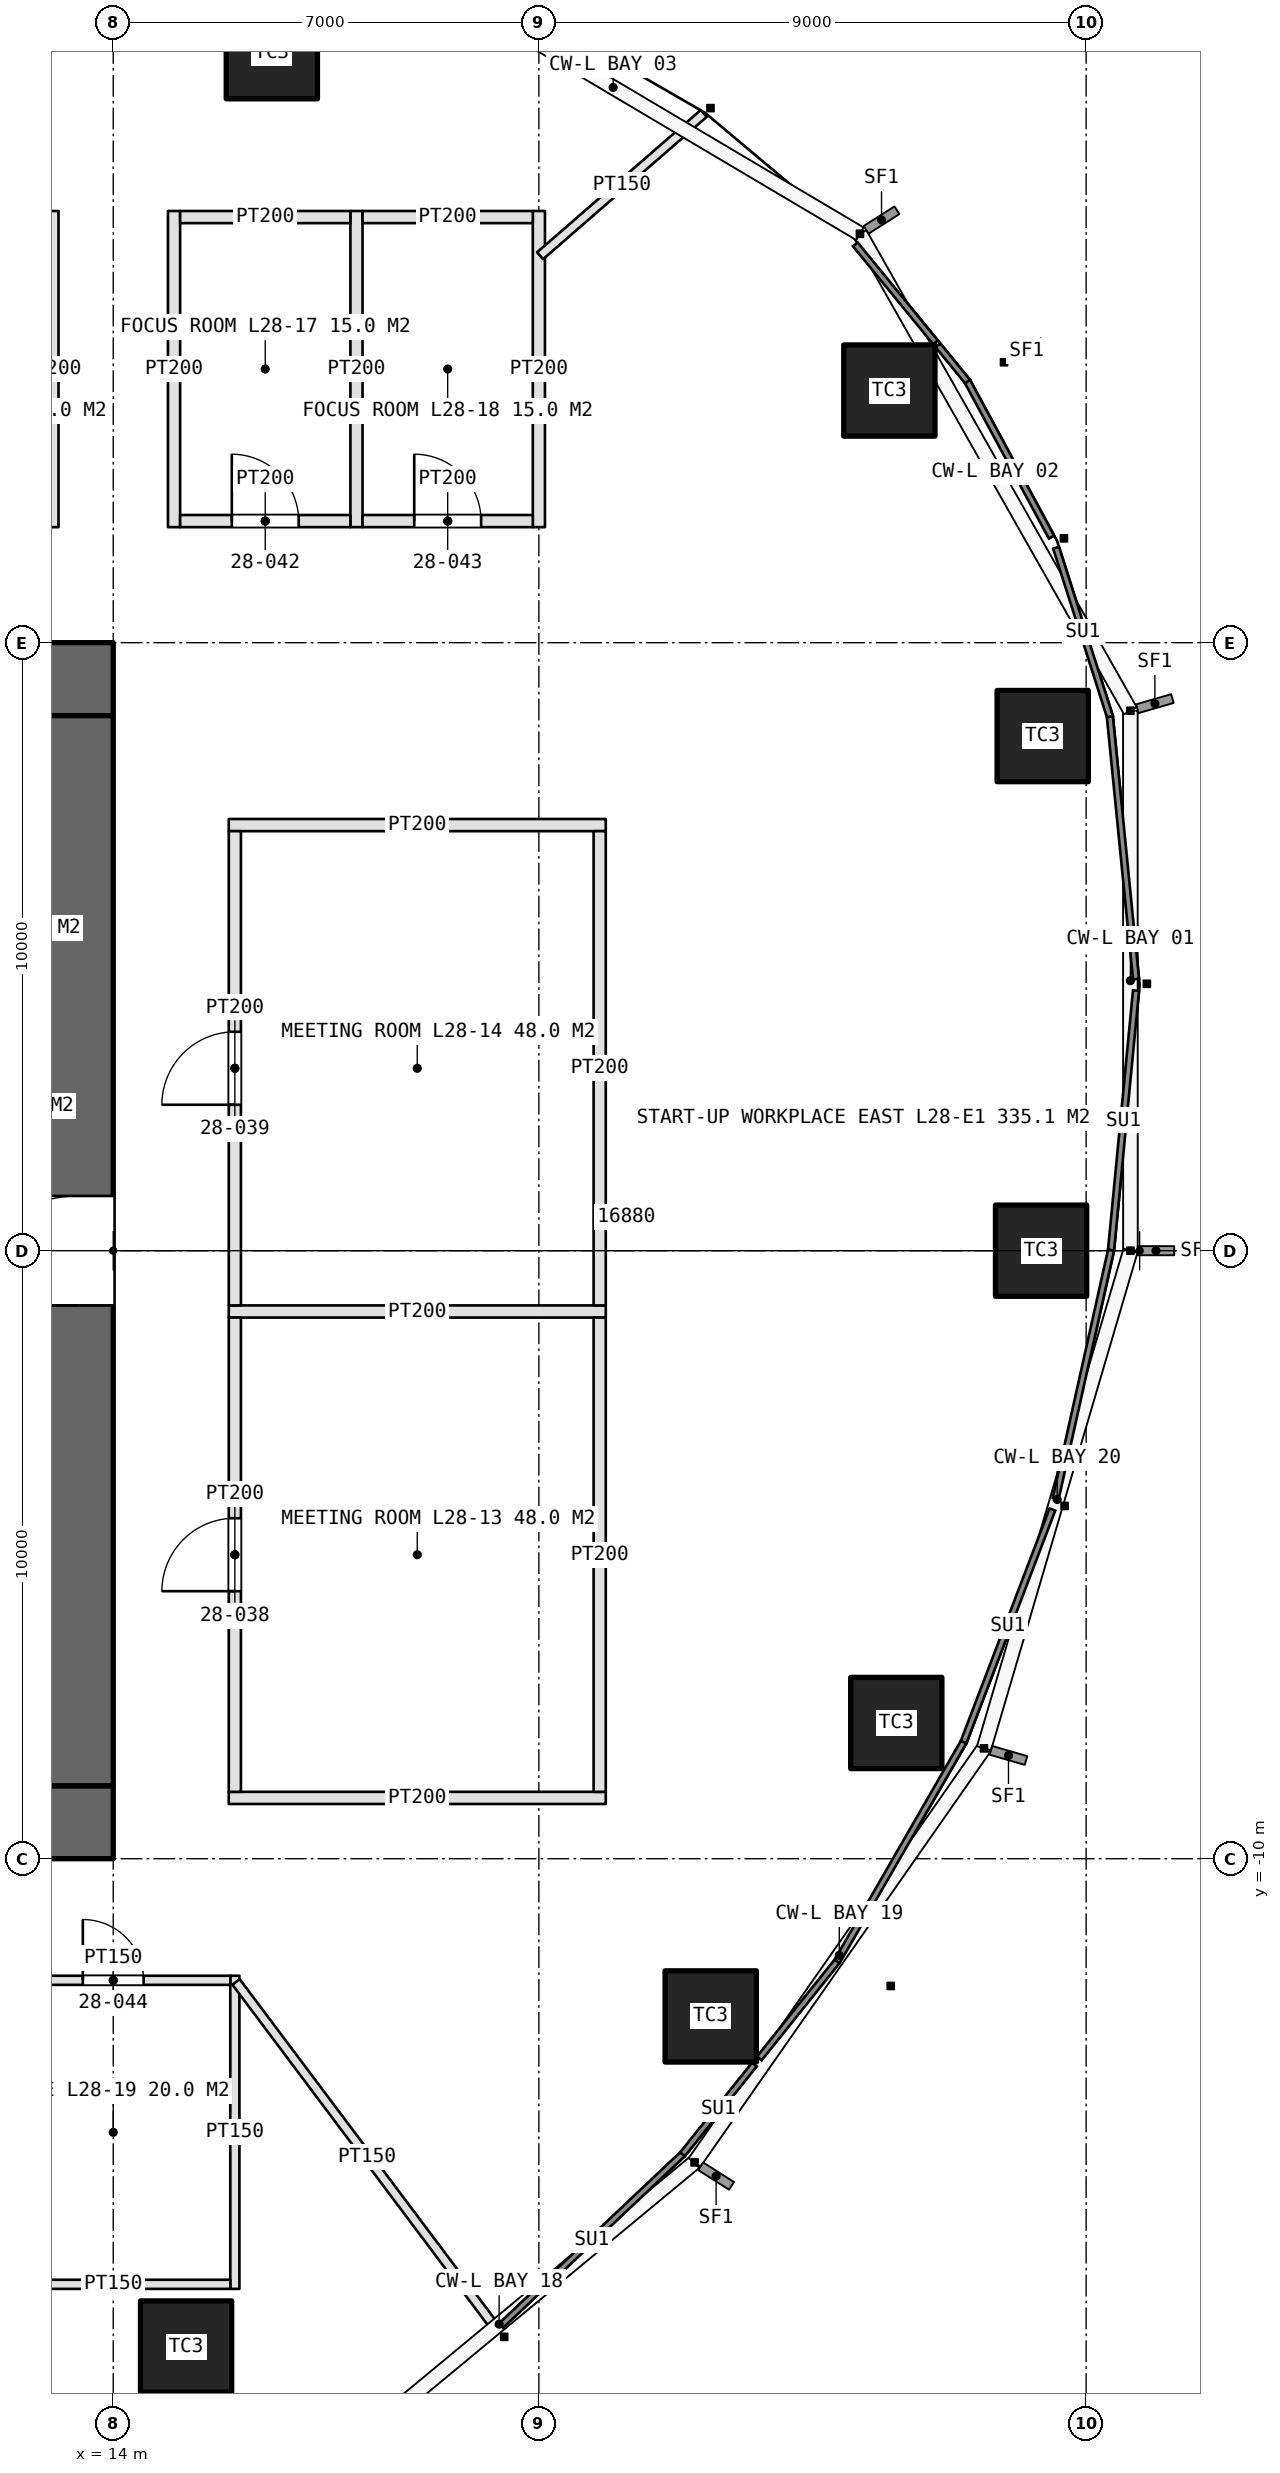
"""IFC4 building model, lengths in metres.
Left out: names, types, materials, properties, quantities, classifications, styles, units other than length and angle.
Written with IfcOpenShell. Run it as: python <this file> out.ifc"""

import sys

from ifc_helpers import new_model, si_unit, direction, frame, frame_2d, origin, origin_2d, place, context, subcontext, project, spatial, rectangle, extrude, element, fill, save


model = new_model("IFC4")
c1 = context("Model", 3, precision=1e-05, world=origin(), true_north=direction((0.0, 1.0)))
c2 = subcontext(c1, "Body", "Model", "MODEL_VIEW")
j1 = project(units=[si_unit("LENGTHUNIT", "METRE"), si_unit("PLANEANGLEUNIT", "RADIAN")], contexts=[c1])
p1 = place(None, origin())
s1 = spatial("IfcSite", under=j1, at=p1, CompositionType="ELEMENT")
p2 = place(p1, origin())
s2 = spatial("IfcBuilding", under=s1, at=p2, CompositionType="ELEMENT")
p3 = place(p2, frame((0.0, 0.0, 134.4)))
s3 = spatial("IfcBuildingStorey", under=s2, at=p3, CompositionType="ELEMENT", Elevation=134.4)
p4 = place(p3, frame((-14.0, -9.4, 0.0), z_axis=(0.0, 0.0, 1.0), x_axis=(1.0, 0.0, 0.0)))
e1 = element("IfcWall", 1, at=p4, inside=s3, PredefinedType="SHEAR", context=c2, shape_type="SweptSolid", body=[
    extrude(rectangle(XDim=28.0, YDim=1.2, at=frame_2d((14.0, 0.0))), origin(), (0.0, 0.0, 1.0), 4.2),
])
p5 = place(p4, frame((13.1, 0.0, 0.0)))
e2 = element("IfcOpeningElement", 2, at=p5, cuts=e1, PredefinedType="OPENING", context=c2, shape_type="SweptSolid", body=[
    extrude(rectangle(XDim=1.8, YDim=2.4, at=frame_2d((0.9, 1.2))), frame((0.0, 0.61, 0.0), z_axis=(0.0, -1.0, 0.0), x_axis=(1.0, 0.0, 0.0)), (0.0, 0.0, 1.0), 1.22),
])
p6 = place(p4, frame((22.9, 0.0, 0.0)))
e3 = element("IfcOpeningElement", 3, at=p6, cuts=e1, PredefinedType="OPENING", context=c2, shape_type="SweptSolid", body=[
    extrude(rectangle(XDim=2.2, YDim=2.7, at=frame_2d((1.1, 1.35))), frame((0.0, 0.61, 0.0), z_axis=(0.0, -1.0, 0.0), x_axis=(1.0, 0.0, 0.0)), (0.0, 0.0, 1.0), 1.22),
])
p7 = place(p3, frame((14.0, 9.4, 0.0), z_axis=(0.0, 0.0, 1.0), x_axis=(-1.0, 0.0, 0.0)))
e4 = element("IfcWall", 4, at=p7, inside=s3, PredefinedType="SHEAR", context=c2, shape_type="SweptSolid", body=[
    extrude(rectangle(XDim=28.0, YDim=1.2, at=frame_2d((14.0, 0.0))), origin(), (0.0, 0.0, 1.0), 4.2),
])
p8 = place(p7, frame((24.0, 0.0, 0.0)))
e5 = element("IfcOpeningElement", 5, at=p8, cuts=e4, PredefinedType="OPENING", context=c2, shape_type="SweptSolid", body=[
    extrude(rectangle(XDim=1.0, YDim=2.4, at=frame_2d((0.5, 1.2))), frame((0.0, 0.61, 0.0), z_axis=(0.0, -1.0, 0.0), x_axis=(1.0, 0.0, 0.0)), (0.0, 0.0, 1.0), 1.22),
])
p9 = place(p7, frame((13.1, 0.0, 0.0)))
e6 = element("IfcOpeningElement", 6, at=p9, cuts=e4, PredefinedType="OPENING", context=c2, shape_type="SweptSolid", body=[
    extrude(rectangle(XDim=1.8, YDim=2.4, at=frame_2d((0.9, 1.2))), frame((0.0, 0.61, 0.0), z_axis=(0.0, -1.0, 0.0), x_axis=(1.0, 0.0, 0.0)), (0.0, 0.0, 1.0), 1.22),
])
p10 = place(p3, frame((13.4, -8.8, 0.0), z_axis=(0.0, 0.0, 1.0), x_axis=(0.0, 1.0, 0.0)))
e7 = element("IfcWall", 7, at=p10, inside=s3, PredefinedType="SHEAR", context=c2, shape_type="SweptSolid", body=[
    extrude(rectangle(XDim=17.6, YDim=1.2, at=frame_2d((8.8, 0.0))), origin(), (0.0, 0.0, 1.0), 4.2),
])
p11 = place(p10, frame((7.9, 0.0, 0.0)))
e8 = element("IfcOpeningElement", 8, at=p11, cuts=e7, PredefinedType="OPENING", context=c2, shape_type="SweptSolid", body=[
    extrude(rectangle(XDim=1.8, YDim=2.4, at=frame_2d((0.9, 1.2))), frame((0.0, 0.61, 0.0), z_axis=(0.0, -1.0, 0.0), x_axis=(1.0, 0.0, 0.0)), (0.0, 0.0, 1.0), 1.22),
])
for number, where, z_axis, x_axis in (
    (9, (29.259, 0.0, 0.0), (0.0, 0.0, 1.0), (1.0, 0.0, 0.0)),
    (10, (29.286, 8.464, 0.0), (0.0, 0.0, 1.0), (1.0, 0.0, 0.0)),
    (11, (26.764, 14.147, 0.0), (0.0, 0.0, 1.0), (1.0, 0.0, 0.0)),
    (12, (16.608, 19.695, 0.0), (0.0, 0.0, 1.0), (1.0, 0.0, 0.0)),
    (13, (15.198, -18.023, 0.0), (0.0, 0.0, 1.0), (1.0, 0.0, 0.0)),
    (14, (23.826, -12.594, 0.0), (0.0, 0.0, 1.0), (1.0, 0.0, 0.0)),
    (15, (26.878, -7.768, 0.0), (0.0, 0.0, 1.0), (1.0, 0.0, 0.0)),
):
    element("IfcColumn", number, at=place(p3, frame(where, z_axis=z_axis, x_axis=x_axis)), inside=s3, PredefinedType="COLUMN", context=c2, shape_type="SweptSolid", body=[
        extrude(rectangle(XDim=1.5, YDim=1.5, at=origin_2d()), origin(), (0.0, 0.0, 1.0), 4.2),
    ])
p12 = place(p3, frame((13.0, 11.9, 0.0), z_axis=(0.0, 0.0, 1.0), x_axis=(0.0, 1.0, 0.0)))
e16 = element("IfcWall", 16, at=p12, inside=s3, PredefinedType="PARTITIONING", context=c2, shape_type="SweptSolid", body=[
    extrude(rectangle(XDim=5.2, YDim=0.2, at=frame_2d((2.6, 0.0))), origin(), (0.0, 0.0, 1.0), 3.0),
])
for number, where, z_axis, x_axis in (
    (17, (15.9, -9.0, 0.0), (0.0, 0.0, 1.0), (1.0, 0.0, 0.0)),
    (18, (15.9, -1.0, 0.0), (0.0, 0.0, 1.0), (1.0, 0.0, 0.0)),
    (19, (15.9, 7.0, 0.0), (0.0, 0.0, 1.0), (1.0, 0.0, 0.0)),
):
    element("IfcWall", number, at=place(p3, frame(where, z_axis=z_axis, x_axis=x_axis)), inside=s3, PredefinedType="PARTITIONING", context=c2, shape_type="SweptSolid", body=[
        extrude(rectangle(XDim=6.2, YDim=0.2, at=frame_2d((3.1, 0.0))), origin(), (0.0, 0.0, 1.0), 3.0),
    ])
p13 = place(p3, frame((16.0, -8.9, 0.0), z_axis=(0.0, 0.0, 1.0), x_axis=(0.0, 1.0, 0.0)))
e20 = element("IfcWall", 20, at=p13, inside=s3, PredefinedType="PARTITIONING", context=c2, shape_type="SweptSolid", body=[
    extrude(rectangle(XDim=7.8, YDim=0.2, at=frame_2d((3.9, 0.0))), origin(), (0.0, 0.0, 1.0), 3.0),
])
p14 = place(p13, frame((3.3, 0.0, 0.0)))
e21 = element("IfcOpeningElement", 21, at=p14, cuts=e20, PredefinedType="OPENING", context=c2, shape_type="SweptSolid", body=[
    extrude(rectangle(XDim=1.2, YDim=2.4, at=frame_2d((0.6, 1.2))), frame((0.0, 0.11, 0.0), z_axis=(0.0, -1.0, 0.0), x_axis=(1.0, 0.0, 0.0)), (0.0, 0.0, 1.0), 0.22),
])
p15 = place(p3, frame((22.0, -8.9, 0.0), z_axis=(0.0, 0.0, 1.0), x_axis=(0.0, 1.0, 0.0)))
e22 = element("IfcWall", 22, at=p15, inside=s3, PredefinedType="PARTITIONING", context=c2, shape_type="SweptSolid", body=[
    extrude(rectangle(XDim=7.8, YDim=0.2, at=frame_2d((3.9, 0.0))), origin(), (0.0, 0.0, 1.0), 3.0),
])
p16 = place(p3, frame((16.0, -0.9, 0.0), z_axis=(0.0, 0.0, 1.0), x_axis=(0.0, 1.0, 0.0)))
e23 = element("IfcWall", 23, at=p16, inside=s3, PredefinedType="PARTITIONING", context=c2, shape_type="SweptSolid", body=[
    extrude(rectangle(XDim=7.8, YDim=0.2, at=frame_2d((3.9, 0.0))), origin(), (0.0, 0.0, 1.0), 3.0),
])
p17 = place(p16, frame((3.3, 0.0, 0.0)))
e24 = element("IfcOpeningElement", 24, at=p17, cuts=e23, PredefinedType="OPENING", context=c2, shape_type="SweptSolid", body=[
    extrude(rectangle(XDim=1.2, YDim=2.4, at=frame_2d((0.6, 1.2))), frame((0.0, 0.11, 0.0), z_axis=(0.0, -1.0, 0.0), x_axis=(1.0, 0.0, 0.0)), (0.0, 0.0, 1.0), 0.22),
])
p18 = place(p3, frame((22.0, -0.9, 0.0), z_axis=(0.0, 0.0, 1.0), x_axis=(0.0, 1.0, 0.0)))
e25 = element("IfcWall", 25, at=p18, inside=s3, PredefinedType="PARTITIONING", context=c2, shape_type="SweptSolid", body=[
    extrude(rectangle(XDim=7.8, YDim=0.2, at=frame_2d((3.9, 0.0))), origin(), (0.0, 0.0, 1.0), 3.0),
])
for number, where, z_axis, x_axis in (
    (26, (15.0, 11.9, 0.0), (0.0, 0.0, 1.0), (0.0, 1.0, 0.0)),
    (27, (18.0, 11.9, 0.0), (0.0, 0.0, 1.0), (0.0, 1.0, 0.0)),
    (28, (21.0, 11.9, 0.0), (0.0, 0.0, 1.0), (0.0, 1.0, 0.0)),
):
    element("IfcWall", number, at=place(p3, frame(where, z_axis=z_axis, x_axis=x_axis)), inside=s3, PredefinedType="PARTITIONING", context=c2, shape_type="SweptSolid", body=[
        extrude(rectangle(XDim=5.2, YDim=0.2, at=frame_2d((2.6, 0.0))), origin(), (0.0, 0.0, 1.0), 3.0),
    ])
p19 = place(p3, frame((15.1, 12.0, 0.0), z_axis=(0.0, 0.0, 1.0), x_axis=(1.0, 0.0, 0.0)))
e29 = element("IfcWall", 29, at=p19, inside=s3, PredefinedType="PARTITIONING", context=c2, shape_type="SweptSolid", body=[
    extrude(rectangle(XDim=2.8, YDim=0.2, at=frame_2d((1.4, 0.0))), origin(), (0.0, 0.0, 1.0), 3.0),
])
p20 = place(p19, frame((0.85, 0.0, 0.0)))
e30 = element("IfcOpeningElement", 30, at=p20, cuts=e29, PredefinedType="OPENING", context=c2, shape_type="SweptSolid", body=[
    extrude(rectangle(XDim=1.1, YDim=2.3, at=frame_2d((0.55, 1.15))), frame((0.0, 0.11, 0.0), z_axis=(0.0, -1.0, 0.0), x_axis=(1.0, 0.0, 0.0)), (0.0, 0.0, 1.0), 0.22),
])
p21 = place(p3, frame((15.1, 17.0, 0.0), z_axis=(0.0, 0.0, 1.0), x_axis=(1.0, 0.0, 0.0)))
e31 = element("IfcWall", 31, at=p21, inside=s3, PredefinedType="PARTITIONING", context=c2, shape_type="SweptSolid", body=[
    extrude(rectangle(XDim=2.8, YDim=0.2, at=frame_2d((1.4, 0.0))), origin(), (0.0, 0.0, 1.0), 3.0),
])
p22 = place(p3, frame((18.1, 12.0, 0.0), z_axis=(0.0, 0.0, 1.0), x_axis=(1.0, 0.0, 0.0)))
e32 = element("IfcWall", 32, at=p22, inside=s3, PredefinedType="PARTITIONING", context=c2, shape_type="SweptSolid", body=[
    extrude(rectangle(XDim=2.8, YDim=0.2, at=frame_2d((1.4, 0.0))), origin(), (0.0, 0.0, 1.0), 3.0),
])
p23 = place(p22, frame((0.85, 0.0, 0.0)))
e33 = element("IfcOpeningElement", 33, at=p23, cuts=e32, PredefinedType="OPENING", context=c2, shape_type="SweptSolid", body=[
    extrude(rectangle(XDim=1.1, YDim=2.3, at=frame_2d((0.55, 1.15))), frame((0.0, 0.11, 0.0), z_axis=(0.0, -1.0, 0.0), x_axis=(1.0, 0.0, 0.0)), (0.0, 0.0, 1.0), 0.22),
])
p24 = place(p3, frame((18.1, 17.0, 0.0), z_axis=(0.0, 0.0, 1.0), x_axis=(1.0, 0.0, 0.0)))
e34 = element("IfcWall", 34, at=p24, inside=s3, PredefinedType="PARTITIONING", context=c2, shape_type="SweptSolid", body=[
    extrude(rectangle(XDim=2.8, YDim=0.2, at=frame_2d((1.4, 0.0))), origin(), (0.0, 0.0, 1.0), 3.0),
])
p25 = place(p3, frame((16.0, -11.925, 0.0), z_axis=(0.0, 0.0, 1.0), x_axis=(0.0, -1.0, 0.0)))
e35 = element("IfcWall", 35, at=p25, inside=s3, PredefinedType="PARTITIONING", context=c2, shape_type="SweptSolid", body=[
    extrude(rectangle(XDim=5.15, YDim=0.15, at=frame_2d((2.575, 0.0))), origin(), (0.0, 0.0, 1.0), 3.0),
])
p26 = place(p3, frame((12.075, -12.0, 0.0), z_axis=(0.0, 0.0, 1.0), x_axis=(1.0, 0.0, 0.0)))
e36 = element("IfcWall", 36, at=p26, inside=s3, PredefinedType="PARTITIONING", context=c2, shape_type="SweptSolid", body=[
    extrude(rectangle(XDim=3.85, YDim=0.15, at=frame_2d((1.925, 0.0))), origin(), (0.0, 0.0, 1.0), 3.0),
])
p27 = place(p26, frame((1.425, 0.0, 0.0)))
e37 = element("IfcOpeningElement", 37, at=p27, cuts=e36, PredefinedType="OPENING", context=c2, shape_type="SweptSolid", body=[
    extrude(rectangle(XDim=1.0, YDim=2.2, at=frame_2d((0.5, 1.1))), frame((0.0, 0.085, 0.0), z_axis=(0.0, -1.0, 0.0), x_axis=(1.0, 0.0, 0.0)), (0.0, 0.0, 1.0), 0.17),
])
p28 = place(p3, frame((12.075, -17.0, 0.0), z_axis=(0.0, 0.0, 1.0), x_axis=(1.0, 0.0, 0.0)))
e38 = element("IfcWall", 38, at=p28, inside=s3, PredefinedType="PARTITIONING", context=c2, shape_type="SweptSolid", body=[
    extrude(rectangle(XDim=3.85, YDim=0.15, at=frame_2d((1.925, 0.0))), origin(), (0.0, 0.0, 1.0), 3.0),
])
p29 = place(p3, frame((16.02, -12.027, 0.0), z_axis=(0.0, 0.0, 1.0), x_axis=(0.600043534749, -0.799967347087, 0.0)))
e39 = element("IfcWall", 39, at=p29, inside=s3, PredefinedType="PARTITIONING", context=c2, shape_type="SweptSolid", body=[
    extrude(rectangle(XDim=7.178, YDim=0.15, at=frame_2d((3.589, 0.0))), origin(), (0.0, 0.0, 1.0), 3.0),
])
p30 = place(p3, frame((21.02, 16.364, 0.0), z_axis=(0.0, 0.0, 1.0), x_axis=(0.75467183248, 0.656102450278, 0.0)))
e40 = element("IfcWall", 40, at=p30, inside=s3, PredefinedType="PARTITIONING", context=c2, shape_type="SweptSolid", body=[
    extrude(rectangle(XDim=3.567, YDim=0.15, at=frame_2d((1.783, 0.0))), origin(), (0.0, 0.0, 1.0), 3.0),
])
p31 = place(p11, origin())
e41 = element("IfcDoor", 41, at=p31, inside=s3, OperationType="DOUBLE_DOOR_SINGLE_SWING", PredefinedType="DOOR", context=c2, shape_type="SweptSolid", body=[
    extrude(rectangle(XDim=1.8, YDim=2.4, at=frame_2d((0.9, 1.2))), frame((0.0, 0.025, 0.0), z_axis=(0.0, -1.0, 0.0), x_axis=(1.0, 0.0, 0.0)), (0.0, 0.0, 1.0), 0.05),
])
fill(e8, e41)
p32 = place(p14, origin())
e42 = element("IfcDoor", 42, at=p32, inside=s3, OperationType="SINGLE_SWING_LEFT", PredefinedType="DOOR", context=c2, shape_type="SweptSolid", body=[
    extrude(rectangle(XDim=1.2, YDim=2.4, at=frame_2d((0.6, 1.2))), frame((0.0, 0.025, 0.0), z_axis=(0.0, -1.0, 0.0), x_axis=(1.0, 0.0, 0.0)), (0.0, 0.0, 1.0), 0.05),
])
fill(e21, e42)
p33 = place(p17, origin())
e43 = element("IfcDoor", 43, at=p33, inside=s3, OperationType="SINGLE_SWING_LEFT", PredefinedType="DOOR", context=c2, shape_type="SweptSolid", body=[
    extrude(rectangle(XDim=1.2, YDim=2.4, at=frame_2d((0.6, 1.2))), frame((0.0, 0.025, 0.0), z_axis=(0.0, -1.0, 0.0), x_axis=(1.0, 0.0, 0.0)), (0.0, 0.0, 1.0), 0.05),
])
fill(e24, e43)
p34 = place(p20, origin())
e44 = element("IfcDoor", 44, at=p34, inside=s3, OperationType="SINGLE_SWING_LEFT", PredefinedType="DOOR", context=c2, shape_type="SweptSolid", body=[
    extrude(rectangle(XDim=1.1, YDim=2.3, at=frame_2d((0.55, 1.15))), frame((0.0, 0.025, 0.0), z_axis=(0.0, -1.0, 0.0), x_axis=(1.0, 0.0, 0.0)), (0.0, 0.0, 1.0), 0.05),
])
fill(e30, e44)
p35 = place(p23, origin())
e45 = element("IfcDoor", 45, at=p35, inside=s3, OperationType="SINGLE_SWING_LEFT", PredefinedType="DOOR", context=c2, shape_type="SweptSolid", body=[
    extrude(rectangle(XDim=1.1, YDim=2.3, at=frame_2d((0.55, 1.15))), frame((0.0, 0.025, 0.0), z_axis=(0.0, -1.0, 0.0), x_axis=(1.0, 0.0, 0.0)), (0.0, 0.0, 1.0), 0.05),
])
fill(e33, e45)
p36 = place(p27, origin())
e46 = element("IfcDoor", 46, at=p36, inside=s3, OperationType="SINGLE_SWING_LEFT", PredefinedType="DOOR", context=c2, shape_type="SweptSolid", body=[
    extrude(rectangle(XDim=1.0, YDim=2.2, at=frame_2d((0.5, 1.1))), frame((0.0, 0.025, 0.0), z_axis=(0.0, -1.0, 0.0), x_axis=(1.0, 0.0, 0.0)), (0.0, 0.0, 1.0), 0.05),
])
fill(e37, e46)
save(model, sys.argv[1])
